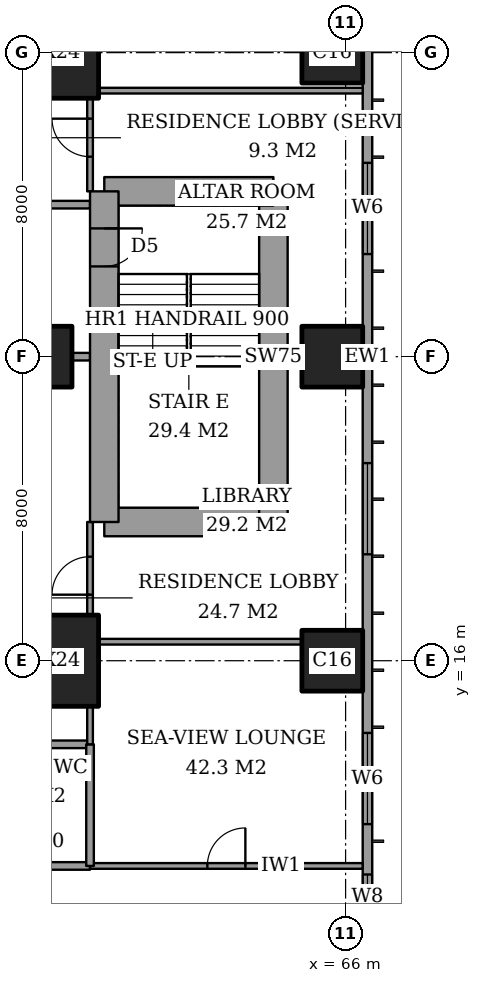
"""IFC4 building model, lengths in metres.
Left out: names, types, materials, properties, quantities, classifications, styles, units other than length and angle.
Written with IfcOpenShell. Run it as: python <this file> out.ifc"""

import sys

from ifc_helpers import new_model, si_unit, direction, frame, frame_2d, origin, origin_2d, place, context, subcontext, project, spatial, rectangle, extrude, element, fill, save


model = new_model("IFC4")
c1 = context("Model", 3, precision=1e-05, world=origin(), true_north=direction((0.0, 1.0)))
c2 = subcontext(c1, "Body", "Model", "MODEL_VIEW")
j1 = project(units=[si_unit("LENGTHUNIT", "METRE"), si_unit("PLANEANGLEUNIT", "RADIAN")], contexts=[c1])
p1 = place(None, origin())
s1 = spatial("IfcSite", under=j1, at=p1, CompositionType="ELEMENT")
p2 = place(p1, origin())
s2 = spatial("IfcBuilding", under=s1, at=p2, CompositionType="ELEMENT")
p3 = place(p2, frame((0.0, 0.0, 266.4)))
s3 = spatial("IfcBuildingStorey", under=s2, at=p3, CompositionType="ELEMENT", Elevation=266.4)
p4 = place(p3, frame((58.0, 16.0, 0.0), z_axis=(0.0, 0.0, 1.0), x_axis=(1.0, 0.0, 0.0)))
e1 = element("IfcColumn", 1, at=p4, inside=s3, PredefinedType="COLUMN", context=c2, shape_type="SweptSolid", body=[
    extrude(rectangle(XDim=3.0, YDim=2.4, at=origin_2d()), origin(), (0.0, 0.0, 1.0), 3.6),
])
p5 = place(p3, frame((58.0, 24.0, 0.0), z_axis=(0.0, 0.0, 1.0), x_axis=(1.0, 0.0, 0.0)))
e2 = element("IfcColumn", 2, at=p5, inside=s3, PredefinedType="COLUMN", context=c2, shape_type="SweptSolid", body=[
    extrude(rectangle(XDim=1.6, YDim=1.6, at=origin_2d()), origin(), (0.0, 0.0, 1.0), 3.6),
])
p6 = place(p3, frame((58.0, 32.0, 0.0), z_axis=(0.0, 0.0, 1.0), x_axis=(1.0, 0.0, 0.0)))
e3 = element("IfcColumn", 3, at=p6, inside=s3, PredefinedType="COLUMN", context=c2, shape_type="SweptSolid", body=[
    extrude(rectangle(XDim=3.0, YDim=2.4, at=origin_2d()), origin(), (0.0, 0.0, 1.0), 3.6),
])
for number, where, z_axis, x_axis in (
    (4, (65.65, 16.0, 0.0), (0.0, 0.0, 1.0), (1.0, 0.0, 0.0)),
    (5, (65.65, 24.0, 0.0), (0.0, 0.0, 1.0), (1.0, 0.0, 0.0)),
    (6, (65.65, 32.0, 0.0), (0.0, 0.0, 1.0), (1.0, 0.0, 0.0)),
):
    element("IfcColumn", number, at=place(p3, frame(where, z_axis=z_axis, x_axis=x_axis)), inside=s3, PredefinedType="COLUMN", context=c2, shape_type="SweptSolid", body=[
        extrude(rectangle(XDim=1.6, YDim=1.6, at=origin_2d()), origin(), (0.0, 0.0, 1.0), 3.6),
    ])
p7 = place(p3, frame((59.65, 19.65, 0.0), z_axis=(0.0, 0.0, 1.0), x_axis=(1.0, 0.0, 0.0)))
e7 = element("IfcWall", 7, at=p7, inside=s3, PredefinedType="SHEAR", context=c2, shape_type="SweptSolid", body=[
    extrude(rectangle(XDim=4.45, YDim=0.75, at=frame_2d((2.225, 0.0))), origin(), (0.0, 0.0, 1.0), 3.6),
])
p8 = place(p3, frame((64.1, 19.65, 0.0), z_axis=(0.0, 0.0, 1.0), x_axis=(0.0, 1.0, 0.0)))
e8 = element("IfcWall", 8, at=p8, inside=s3, PredefinedType="SHEAR", context=c2, shape_type="SweptSolid", body=[
    extrude(rectangle(XDim=8.7, YDim=0.75, at=frame_2d((4.35, 0.0))), origin(), (0.0, 0.0, 1.0), 3.6),
])
p9 = place(p3, frame((64.1, 28.35, 0.0), z_axis=(0.0, 0.0, 1.0), x_axis=(-1.0, 0.0, 0.0)))
e9 = element("IfcWall", 9, at=p9, inside=s3, PredefinedType="SHEAR", context=c2, shape_type="SweptSolid", body=[
    extrude(rectangle(XDim=4.45, YDim=0.75, at=frame_2d((2.225, 0.0))), origin(), (0.0, 0.0, 1.0), 3.6),
])
p10 = place(p3, frame((59.65, 28.35, 0.0), z_axis=(0.0, 0.0, 1.0), x_axis=(0.0, -1.0, 0.0)))
e10 = element("IfcWall", 10, at=p10, inside=s3, PredefinedType="SHEAR", context=c2, shape_type="SweptSolid", body=[
    extrude(rectangle(XDim=8.7, YDim=0.75, at=frame_2d((4.35, 0.0))), origin(), (0.0, 0.0, 1.0), 3.6),
])
p11 = place(p10, frame((0.975, 0.0, 0.0)))
e11 = element("IfcOpeningElement", 11, at=p11, cuts=e10, PredefinedType="OPENING", context=c2, shape_type="SweptSolid", body=[
    extrude(rectangle(XDim=1.0, YDim=2.1, at=frame_2d((0.5, 1.05))), frame((0.0, 0.385, 0.0), z_axis=(0.0, -1.0, 0.0), x_axis=(1.0, 0.0, 0.0)), (0.0, 0.0, 1.0), 0.77),
])
p12 = place(p3, frame((66.575, 3.175, 0.0), z_axis=(0.0, 0.0, 1.0), x_axis=(0.0, 1.0, 0.0)))
e12 = element("IfcWall", 12, at=p12, inside=s3, PredefinedType="SOLIDWALL", context=c2, shape_type="SweptSolid", body=[
    extrude(rectangle(XDim=41.65, YDim=0.25, at=frame_2d((20.825, 0.0))), origin(), (0.0, 0.0, 1.0), 3.6),
])
p13 = place(p12, frame((0.875, 0.0, 0.6)))
e13 = element("IfcOpeningElement", 13, at=p13, cuts=e12, PredefinedType="OPENING", context=c2, shape_type="SweptSolid", body=[
    extrude(rectangle(XDim=2.4, YDim=2.0, at=frame_2d((1.2, 1.0))), frame((0.0, 0.135, 0.0), z_axis=(0.0, -1.0, 0.0), x_axis=(1.0, 0.0, 0.0)), (0.0, 0.0, 1.0), 0.27),
])
p14 = place(p12, frame((6.0, 0.0, 0.6)))
e14 = element("IfcOpeningElement", 14, at=p14, cuts=e12, PredefinedType="OPENING", context=c2, shape_type="SweptSolid", body=[
    extrude(rectangle(XDim=1.2, YDim=2.0, at=frame_2d((0.6, 1.0))), frame((0.0, 0.135, 0.0), z_axis=(0.0, -1.0, 0.0), x_axis=(1.0, 0.0, 0.0)), (0.0, 0.0, 1.0), 0.27),
])
p15 = place(p12, frame((8.525, 0.0, 0.6)))
e15 = element("IfcOpeningElement", 15, at=p15, cuts=e12, PredefinedType="OPENING", context=c2, shape_type="SweptSolid", body=[
    extrude(rectangle(XDim=2.4, YDim=2.0, at=frame_2d((1.2, 1.0))), frame((0.0, 0.135, 0.0), z_axis=(0.0, -1.0, 0.0), x_axis=(1.0, 0.0, 0.0)), (0.0, 0.0, 1.0), 0.27),
])
p16 = place(p12, frame((15.625, 0.0, 0.6)))
e16 = element("IfcOpeningElement", 16, at=p16, cuts=e12, PredefinedType="OPENING", context=c2, shape_type="SweptSolid", body=[
    extrude(rectangle(XDim=2.4, YDim=2.0, at=frame_2d((1.2, 1.0))), frame((0.0, 0.135, 0.0), z_axis=(0.0, -1.0, 0.0), x_axis=(1.0, 0.0, 0.0)), (0.0, 0.0, 1.0), 0.27),
])
p17 = place(p12, frame((23.525, 0.0, 0.6)))
e17 = element("IfcOpeningElement", 17, at=p17, cuts=e12, PredefinedType="OPENING", context=c2, shape_type="SweptSolid", body=[
    extrude(rectangle(XDim=2.4, YDim=2.0, at=frame_2d((1.2, 1.0))), frame((0.0, 0.135, 0.0), z_axis=(0.0, -1.0, 0.0), x_axis=(1.0, 0.0, 0.0)), (0.0, 0.0, 1.0), 0.27),
])
p18 = place(p12, frame((30.625, 0.0, 0.6)))
e18 = element("IfcOpeningElement", 18, at=p18, cuts=e12, PredefinedType="OPENING", context=c2, shape_type="SweptSolid", body=[
    extrude(rectangle(XDim=2.4, YDim=2.0, at=frame_2d((1.2, 1.0))), frame((0.0, 0.135, 0.0), z_axis=(0.0, -1.0, 0.0), x_axis=(1.0, 0.0, 0.0)), (0.0, 0.0, 1.0), 0.27),
])
p19 = place(p12, frame((34.325, 0.0, 0.6)))
e19 = element("IfcOpeningElement", 19, at=p19, cuts=e12, PredefinedType="OPENING", context=c2, shape_type="SweptSolid", body=[
    extrude(rectangle(XDim=1.2, YDim=2.0, at=frame_2d((0.6, 1.0))), frame((0.0, 0.135, 0.0), z_axis=(0.0, -1.0, 0.0), x_axis=(1.0, 0.0, 0.0)), (0.0, 0.0, 1.0), 0.27),
])
p20 = place(p12, frame((38.375, 0.0, 0.6)))
e20 = element("IfcOpeningElement", 20, at=p20, cuts=e12, PredefinedType="OPENING", context=c2, shape_type="SweptSolid", body=[
    extrude(rectangle(XDim=2.4, YDim=2.0, at=frame_2d((1.2, 1.0))), frame((0.0, 0.135, 0.0), z_axis=(0.0, -1.0, 0.0), x_axis=(1.0, 0.0, 0.0)), (0.0, 0.0, 1.0), 0.27),
])
p21 = place(p3, frame((56.2, 10.6, 0.0), z_axis=(0.0, 0.0, 1.0), x_axis=(1.0, 0.0, 0.0)))
e21 = element("IfcWall", 21, at=p21, inside=s3, PredefinedType="PARTITIONING", context=c2, shape_type="SweptSolid", body=[
    extrude(rectangle(XDim=3.075, YDim=0.2, at=frame_2d((1.538, 0.0))), origin(), (0.0, 0.0, 1.0), 3.35),
])
p22 = place(p21, frame((1.087, 0.0, 0.0)))
e22 = element("IfcOpeningElement", 22, at=p22, cuts=e21, PredefinedType="OPENING", context=c2, shape_type="SweptSolid", body=[
    extrude(rectangle(XDim=0.9, YDim=2.1, at=frame_2d((0.45, 1.05))), frame((0.0, 0.11, 0.0), z_axis=(0.0, -1.0, 0.0), x_axis=(1.0, 0.0, 0.0)), (0.0, 0.0, 1.0), 0.22),
])
p23 = place(p3, frame((59.275, 10.6, 0.0), z_axis=(0.0, 0.0, 1.0), x_axis=(1.0, 0.0, 0.0)))
e23 = element("IfcWall", 23, at=p23, inside=s3, PredefinedType="PARTITIONING", context=c2, shape_type="SweptSolid", body=[
    extrude(rectangle(XDim=7.175, YDim=0.15, at=frame_2d((3.587, 0.0))), origin(), (0.0, 0.0, 1.0), 3.35),
])
p24 = place(p23, frame((3.087, 0.0, 0.0)))
e24 = element("IfcOpeningElement", 24, at=p24, cuts=e23, PredefinedType="OPENING", context=c2, shape_type="SweptSolid", body=[
    extrude(rectangle(XDim=1.0, YDim=2.1, at=frame_2d((0.5, 1.05))), frame((0.0, 0.085, 0.0), z_axis=(0.0, -1.0, 0.0), x_axis=(1.0, 0.0, 0.0)), (0.0, 0.0, 1.0), 0.17),
])
p25 = place(p3, frame((56.2, 13.8, 0.0), z_axis=(0.0, 0.0, 1.0), x_axis=(1.0, 0.0, 0.0)))
e25 = element("IfcWall", 25, at=p25, inside=s3, PredefinedType="PARTITIONING", context=c2, shape_type="SweptSolid", body=[
    extrude(rectangle(XDim=3.075, YDim=0.2, at=frame_2d((1.538, 0.0))), origin(), (0.0, 0.0, 1.0), 3.35),
])
p26 = place(p3, frame((59.5, 16.5, 0.0), z_axis=(0.0, 0.0, 1.0), x_axis=(1.0, 0.0, 0.0)))
e26 = element("IfcWall", 26, at=p26, inside=s3, PredefinedType="PARTITIONING", context=c2, shape_type="SweptSolid", body=[
    extrude(rectangle(XDim=5.35, YDim=0.15, at=frame_2d((2.675, 0.0))), origin(), (0.0, 0.0, 1.0), 3.35),
])
p27 = place(p3, frame((58.8, 24.0, 0.0), z_axis=(0.0, 0.0, 1.0), x_axis=(1.0, 0.0, 0.0)))
e27 = element("IfcWall", 27, at=p27, inside=s3, PredefinedType="PARTITIONING", context=c2, shape_type="SweptSolid", body=[
    extrude(rectangle(XDim=0.475, YDim=0.2, at=frame_2d((0.237, 0.0))), origin(), (0.0, 0.0, 1.0), 3.35),
])
p28 = place(p3, frame((64.475, 24.0, 0.0), z_axis=(0.0, 0.0, 1.0), x_axis=(1.0, 0.0, 0.0)))
e28 = element("IfcWall", 28, at=p28, inside=s3, PredefinedType="PARTITIONING", context=c2, shape_type="SweptSolid", body=[
    extrude(rectangle(XDim=0.375, YDim=0.15, at=frame_2d((0.188, 0.0))), origin(), (0.0, 0.0, 1.0), 3.35),
])
p29 = place(p3, frame((42.0, 28.0, 0.0), z_axis=(0.0, 0.0, 1.0), x_axis=(1.0, 0.0, 0.0)))
e29 = element("IfcWall", 29, at=p29, inside=s3, PredefinedType="PARTITIONING", context=c2, shape_type="SweptSolid", body=[
    extrude(rectangle(XDim=17.275, YDim=0.2, at=frame_2d((8.637, 0.0))), origin(), (0.0, 0.0, 1.0), 3.35),
])
p30 = place(p29, frame((9.4, 0.0, 0.0)))
e30 = element("IfcOpeningElement", 30, at=p30, cuts=e29, PredefinedType="OPENING", context=c2, shape_type="SweptSolid", body=[
    extrude(rectangle(XDim=1.2, YDim=2.4, at=frame_2d((0.6, 1.2))), frame((0.0, 0.11, 0.0), z_axis=(0.0, -1.0, 0.0), x_axis=(1.0, 0.0, 0.0)), (0.0, 0.0, 1.0), 0.22),
])
p31 = place(p3, frame((59.5, 31.0, 0.0), z_axis=(0.0, 0.0, 1.0), x_axis=(1.0, 0.0, 0.0)))
e31 = element("IfcWall", 31, at=p31, inside=s3, PredefinedType="PARTITIONING", context=c2, shape_type="SweptSolid", body=[
    extrude(rectangle(XDim=6.95, YDim=0.15, at=frame_2d((3.475, 0.0))), origin(), (0.0, 0.0, 1.0), 3.35),
])
p32 = place(p3, frame((59.275, 10.6, 0.0), z_axis=(0.0, 0.0, 1.0), x_axis=(0.0, 1.0, 0.0)))
e32 = element("IfcWall", 32, at=p32, inside=s3, PredefinedType="PARTITIONING", context=c2, shape_type="SweptSolid", body=[
    extrude(rectangle(XDim=3.2, YDim=0.2, at=frame_2d((1.6, 0.0))), origin(), (0.0, 0.0, 1.0), 3.35),
])
p33 = place(p3, frame((59.275, 13.8, 0.0), z_axis=(0.0, 0.0, 1.0), x_axis=(0.0, 1.0, 0.0)))
e33 = element("IfcWall", 33, at=p33, inside=s3, PredefinedType="PARTITIONING", context=c2, shape_type="SweptSolid", body=[
    extrude(rectangle(XDim=1.0, YDim=0.15, at=frame_2d((0.5, 0.0))), origin(), (0.0, 0.0, 1.0), 3.35),
])
p34 = place(p3, frame((59.275, 17.2, 0.0), z_axis=(0.0, 0.0, 1.0), x_axis=(0.0, 1.0, 0.0)))
e34 = element("IfcWall", 34, at=p34, inside=s3, PredefinedType="PARTITIONING", context=c2, shape_type="SweptSolid", body=[
    extrude(rectangle(XDim=2.45, YDim=0.15, at=frame_2d((1.225, 0.0))), origin(), (0.0, 0.0, 1.0), 3.35),
])
p35 = place(p34, frame((0.538, 0.0, 0.0)))
e35 = element("IfcOpeningElement", 35, at=p35, cuts=e34, PredefinedType="OPENING", context=c2, shape_type="SweptSolid", body=[
    extrude(rectangle(XDim=1.0, YDim=2.1, at=frame_2d((0.5, 1.05))), frame((0.0, 0.085, 0.0), z_axis=(0.0, -1.0, 0.0), x_axis=(1.0, 0.0, 0.0)), (0.0, 0.0, 1.0), 0.17),
])
p36 = place(p3, frame((59.275, 28.35, 0.0), z_axis=(0.0, 0.0, 1.0), x_axis=(0.0, 1.0, 0.0)))
e36 = element("IfcWall", 36, at=p36, inside=s3, PredefinedType="PARTITIONING", context=c2, shape_type="SweptSolid", body=[
    extrude(rectangle(XDim=2.45, YDim=0.15, at=frame_2d((1.225, 0.0))), origin(), (0.0, 0.0, 1.0), 3.35),
])
p37 = place(p36, frame((0.913, 0.0, 0.0)))
e37 = element("IfcOpeningElement", 37, at=p37, cuts=e36, PredefinedType="OPENING", context=c2, shape_type="SweptSolid", body=[
    extrude(rectangle(XDim=1.0, YDim=2.1, at=frame_2d((0.5, 1.05))), frame((0.0, 0.085, 0.0), z_axis=(0.0, -1.0, 0.0), x_axis=(1.0, 0.0, 0.0)), (0.0, 0.0, 1.0), 0.17),
])
p38 = place(p14, origin())
e38 = element("IfcWindow", 38, at=p38, inside=s3, PartitioningType="SINGLE_PANEL", PredefinedType="WINDOW", context=c2, shape_type="SweptSolid", body=[
    extrude(rectangle(XDim=1.2, YDim=2.0, at=frame_2d((0.6, 1.0))), frame((0.0, 0.03, 0.0), z_axis=(0.0, -1.0, 0.0), x_axis=(1.0, 0.0, 0.0)), (0.0, 0.0, 1.0), 0.06),
])
fill(e14, e38)
p39 = place(p15, origin())
e39 = element("IfcWindow", 39, at=p39, inside=s3, PartitioningType="SINGLE_PANEL", PredefinedType="WINDOW", context=c2, shape_type="SweptSolid", body=[
    extrude(rectangle(XDim=2.4, YDim=2.0, at=frame_2d((1.2, 1.0))), frame((0.0, 0.03, 0.0), z_axis=(0.0, -1.0, 0.0), x_axis=(1.0, 0.0, 0.0)), (0.0, 0.0, 1.0), 0.06),
])
fill(e15, e39)
p40 = place(p16, origin())
e40 = element("IfcWindow", 40, at=p40, inside=s3, PartitioningType="SINGLE_PANEL", PredefinedType="WINDOW", context=c2, shape_type="SweptSolid", body=[
    extrude(rectangle(XDim=2.4, YDim=2.0, at=frame_2d((1.2, 1.0))), frame((0.0, 0.03, 0.0), z_axis=(0.0, -1.0, 0.0), x_axis=(1.0, 0.0, 0.0)), (0.0, 0.0, 1.0), 0.06),
])
fill(e16, e40)
p41 = place(p17, origin())
e41 = element("IfcWindow", 41, at=p41, inside=s3, PartitioningType="SINGLE_PANEL", PredefinedType="WINDOW", context=c2, shape_type="SweptSolid", body=[
    extrude(rectangle(XDim=2.4, YDim=2.0, at=frame_2d((1.2, 1.0))), frame((0.0, 0.03, 0.0), z_axis=(0.0, -1.0, 0.0), x_axis=(1.0, 0.0, 0.0)), (0.0, 0.0, 1.0), 0.06),
])
fill(e17, e41)
p42 = place(p24, origin())
e42 = element("IfcDoor", 42, at=p42, inside=s3, OperationType="SINGLE_SWING_LEFT", PredefinedType="DOOR", context=c2, shape_type="SweptSolid", body=[
    extrude(rectangle(XDim=1.0, YDim=2.1, at=frame_2d((0.5, 1.05))), frame((0.0, 0.025, 0.0), z_axis=(0.0, -1.0, 0.0), x_axis=(1.0, 0.0, 0.0)), (0.0, 0.0, 1.0), 0.05),
])
fill(e24, e42)
p43 = place(p35, origin())
e43 = element("IfcDoor", 43, at=p43, inside=s3, OperationType="SINGLE_SWING_RIGHT", PredefinedType="DOOR", context=c2, shape_type="SweptSolid", body=[
    extrude(rectangle(XDim=1.0, YDim=2.1, at=frame_2d((0.5, 1.05))), frame((0.0, 0.025, 0.0), z_axis=(0.0, -1.0, 0.0), x_axis=(1.0, 0.0, 0.0)), (0.0, 0.0, 1.0), 0.05),
])
fill(e35, e43)
p44 = place(p37, origin())
e44 = element("IfcDoor", 44, at=p44, inside=s3, OperationType="SINGLE_SWING_LEFT", PredefinedType="DOOR", context=c2, shape_type="SweptSolid", body=[
    extrude(rectangle(XDim=1.0, YDim=2.1, at=frame_2d((0.5, 1.05))), frame((0.0, 0.025, 0.0), z_axis=(0.0, -1.0, 0.0), x_axis=(1.0, 0.0, 0.0)), (0.0, 0.0, 1.0), 0.05),
])
fill(e37, e44)
p45 = place(p11, origin())
e45 = element("IfcDoor", 45, at=p45, inside=s3, OperationType="SINGLE_SWING_RIGHT", PredefinedType="DOOR", context=c2, shape_type="SweptSolid", body=[
    extrude(rectangle(XDim=1.0, YDim=2.1, at=frame_2d((0.5, 1.05))), frame((0.0, 0.025, 0.0), z_axis=(0.0, -1.0, 0.0), x_axis=(1.0, 0.0, 0.0)), (0.0, 0.0, 1.0), 0.05),
])
fill(e11, e45)
save(model, sys.argv[1])
